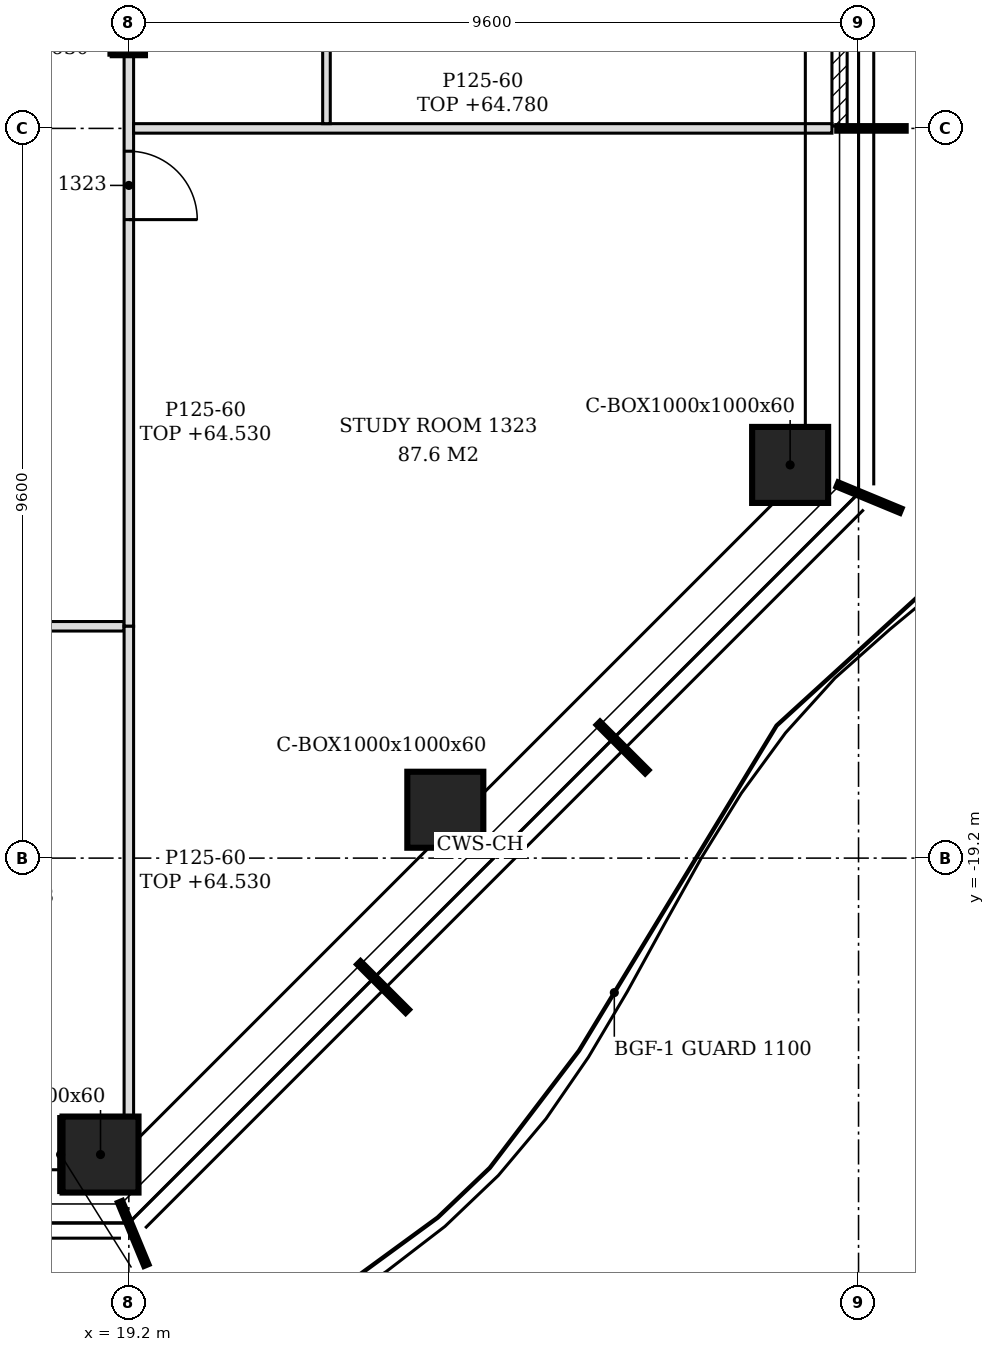
"""IFC4 building model, lengths in metres.
Left out: names, types, materials, properties, quantities, classifications, styles, units other than length and angle.
Written with IfcOpenShell. Run it as: python <this file> out.ifc"""

import sys

from ifc_helpers import new_model, si_unit, direction, frame, frame_2d, origin, origin_2d, place, context, subcontext, project, spatial, polyline, rectangle, hollow_rectangle, i_section, outline, extrude, element, fill, save


model = new_model("IFC4")
c1 = context("Model", 3, precision=1e-05, world=origin(), true_north=direction((0.0, 1.0)))
c2 = subcontext(c1, "Body", "Model", "MODEL_VIEW")
j1 = project(units=[si_unit("LENGTHUNIT", "METRE"), si_unit("PLANEANGLEUNIT", "RADIAN")], contexts=[c1])
p1 = place(None, origin())
s1 = spatial("IfcSite", under=j1, at=p1, CompositionType="ELEMENT")
p2 = place(p1, origin())
s2 = spatial("IfcBuilding", under=s1, at=p2, CompositionType="ELEMENT")
p3 = place(p2, frame((0.0, 0.0, 61.8)))
s3 = spatial("IfcBuildingStorey", under=s2, at=p3, CompositionType="ELEMENT", Elevation=61.8)
for number, where, z_axis, x_axis in (
    (1, (18.827, -23.1, -0.15), (0.0, 0.0, 1.0), (1.0, 0.0, 0.0)),
    (2, (23.364, -18.564, -0.15), (0.0, 0.0, 1.0), (1.0, 0.0, 0.0)),
    (3, (27.9, -14.027, -0.15), (0.0, 0.0, 1.0), (1.0, 0.0, 0.0)),
):
    element("IfcColumn", number, at=place(p3, frame(where, z_axis=z_axis, x_axis=x_axis)), inside=s3, PredefinedType="COLUMN", context=c2, shape_type="SweptSolid", body=[
        extrude(hollow_rectangle(XDim=1.0, YDim=1.0, WallThickness=0.06, at=origin_2d()), origin(), (0.0, 0.0, 1.0), 3.6),
    ])
p4 = place(p3, frame((19.2, -8.4, -0.15), z_axis=(0.0, 0.0, 1.0), x_axis=(1.0, 0.0, 0.0)))
e4 = element("IfcColumn", 4, at=p4, inside=s3, PredefinedType="COLUMN", context=c2, shape_type="SweptSolid", body=[
    extrude(i_section(OverallWidth=0.424, OverallDepth=0.474, WebThickness=0.048, FlangeThickness=0.077, FilletRadius=0.015, at=origin_2d()), origin(), (0.0, 0.0, 1.0), 3.6),
])
p5 = place(p3, frame((28.55, -9.57, 0.0), z_axis=(0.0, 0.0, 1.0), x_axis=(0.0, 1.0, 0.0)))
e5 = element("IfcWall", 5, at=p5, inside=s3, PredefinedType="NOTDEFINED", context=c2, shape_type="SweptSolid", body=[
    extrude(rectangle(XDim=4.74, YDim=0.2, at=frame_2d((2.37, 0.0))), origin(), (0.0, 0.0, 1.0), 3.45),
])
p6 = place(p5, frame((1.17, 0.0, 0.0)))
e6 = element("IfcOpeningElement", 6, at=p6, cuts=e5, PredefinedType="OPENING", context=c2, shape_type="SweptSolid", body=[
    extrude(rectangle(XDim=2.4, YDim=2.4, at=frame_2d((1.2, 1.2))), frame((0.0, 0.11, 0.0), z_axis=(0.0, -1.0, 0.0), x_axis=(1.0, 0.0, 0.0)), (0.0, 0.0, 1.0), 0.22),
])
p7 = place(p3, frame((19.2, -22.6, 0.0), z_axis=(0.0, 0.0, 1.0), x_axis=(0.0, 1.0, 0.0)))
e7 = element("IfcWall", 7, at=p7, inside=s3, PredefinedType="PARTITIONING", context=c2, shape_type="SweptSolid", body=[
    extrude(outline(polyline([(0.0, 0.0), (6.45, 0.0), (6.45, 2.73), (0.43, 2.73), (0.428, 2.63), (0.0, 2.63), (0.0, 0.0)])), frame((0.0, 0.062, 0.0), z_axis=(0.0, -1.0, 0.0), x_axis=(1.0, 0.0, 0.0)), (0.0, 0.0, 1.0), 0.125),
])
p8 = place(p3, frame((-22.55, -16.15, 0.0), z_axis=(0.0, 0.0, 1.0), x_axis=(1.0, 0.0, 0.0)))
e8 = element("IfcWall", 8, at=p8, inside=s3, PredefinedType="PARTITIONING", context=c2, shape_type="SweptSolid", body=[
    extrude(outline(polyline([(0.0, 0.0), (41.688, 0.0), (41.688, 2.73), (41.6, 2.73), (41.598, 3.45), (29.9, 3.45), (29.898, 2.73), (29.6, 2.73), (29.598, 3.45), (17.9, 3.45), (17.898, 2.73), (17.6, 2.73), (17.598, 3.45), (8.3, 3.45), (8.298, 2.93), (8.0, 2.93), (7.998, 3.45), (0.0, 3.45), (0.0, 0.0)])), frame((0.0, 0.062, 0.0), z_axis=(0.0, -1.0, 0.0), x_axis=(1.0, 0.0, 0.0)), (0.0, 0.0, 1.0), 0.125),
])
p9 = place(p8, frame((6.95, 0.0, 0.0)))
e9 = element("IfcOpeningElement", 9, at=p9, cuts=e8, PredefinedType="OPENING", context=c2, shape_type="SweptSolid", body=[
    extrude(rectangle(XDim=0.9, YDim=2.1, at=frame_2d((0.45, 1.05))), frame((0.0, 0.073, 0.0), z_axis=(0.0, -1.0, 0.0), x_axis=(1.0, 0.0, 0.0)), (0.0, 0.0, 1.0), 0.145),
])
p10 = place(p8, frame((11.936, 0.0, 0.0)))
e10 = element("IfcOpeningElement", 10, at=p10, cuts=e8, PredefinedType="OPENING", context=c2, shape_type="SweptSolid", body=[
    extrude(rectangle(XDim=0.9, YDim=2.1, at=frame_2d((0.45, 1.05))), frame((0.0, 0.073, 0.0), z_axis=(0.0, -1.0, 0.0), x_axis=(1.0, 0.0, 0.0)), (0.0, 0.0, 1.0), 0.145),
])
p11 = place(p8, frame((16.55, 0.0, 0.0)))
e11 = element("IfcOpeningElement", 11, at=p11, cuts=e8, PredefinedType="OPENING", context=c2, shape_type="SweptSolid", body=[
    extrude(rectangle(XDim=0.9, YDim=2.1, at=frame_2d((0.45, 1.05))), frame((0.0, 0.073, 0.0), z_axis=(0.0, -1.0, 0.0), x_axis=(1.0, 0.0, 0.0)), (0.0, 0.0, 1.0), 0.145),
])
p12 = place(p8, frame((21.35, 0.0, 0.0)))
e12 = element("IfcOpeningElement", 12, at=p12, cuts=e8, PredefinedType="OPENING", context=c2, shape_type="SweptSolid", body=[
    extrude(rectangle(XDim=0.9, YDim=2.1, at=frame_2d((0.45, 1.05))), frame((0.0, 0.073, 0.0), z_axis=(0.0, -1.0, 0.0), x_axis=(1.0, 0.0, 0.0)), (0.0, 0.0, 1.0), 0.145),
])
p13 = place(p8, frame((26.15, 0.0, 0.0)))
e13 = element("IfcOpeningElement", 13, at=p13, cuts=e8, PredefinedType="OPENING", context=c2, shape_type="SweptSolid", body=[
    extrude(rectangle(XDim=0.9, YDim=2.1, at=frame_2d((0.45, 1.05))), frame((0.0, 0.073, 0.0), z_axis=(0.0, -1.0, 0.0), x_axis=(1.0, 0.0, 0.0)), (0.0, 0.0, 1.0), 0.145),
])
p14 = place(p8, frame((30.764, 0.0, 0.0)))
e14 = element("IfcOpeningElement", 14, at=p14, cuts=e8, PredefinedType="OPENING", context=c2, shape_type="SweptSolid", body=[
    extrude(rectangle(XDim=0.9, YDim=2.1, at=frame_2d((0.45, 1.05))), frame((0.0, 0.073, 0.0), z_axis=(0.0, -1.0, 0.0), x_axis=(1.0, 0.0, 0.0)), (0.0, 0.0, 1.0), 0.145),
])
p15 = place(p8, frame((32.35, 0.0, 0.0)))
e15 = element("IfcOpeningElement", 15, at=p15, cuts=e8, PredefinedType="OPENING", context=c2, shape_type="SweptSolid", body=[
    extrude(rectangle(XDim=0.9, YDim=2.1, at=frame_2d((0.45, 1.05))), frame((0.0, 0.073, 0.0), z_axis=(0.0, -1.0, 0.0), x_axis=(1.0, 0.0, 0.0)), (0.0, 0.0, 1.0), 0.145),
])
p16 = place(p8, frame((37.25, 0.0, 0.0)))
e16 = element("IfcOpeningElement", 16, at=p16, cuts=e8, PredefinedType="OPENING", context=c2, shape_type="SweptSolid", body=[
    extrude(rectangle(XDim=0.9, YDim=2.1, at=frame_2d((0.45, 1.05))), frame((0.0, 0.073, 0.0), z_axis=(0.0, -1.0, 0.0), x_axis=(1.0, 0.0, 0.0)), (0.0, 0.0, 1.0), 0.145),
])
p17 = place(p3, frame((19.2, -16.15, 0.0), z_axis=(0.0, 0.0, 1.0), x_axis=(0.0, 1.0, 0.0)))
e17 = element("IfcWall", 17, at=p17, inside=s3, PredefinedType="PARTITIONING", context=c2, shape_type="SweptSolid", body=[
    extrude(rectangle(XDim=7.513, YDim=0.125, at=frame_2d((3.756, 0.0))), origin(), (0.0, 0.0, 1.0), 2.73),
])
p18 = place(p17, frame((5.35, 0.0, 0.0)))
e18 = element("IfcOpeningElement", 18, at=p18, cuts=e17, PredefinedType="OPENING", context=c2, shape_type="SweptSolid", body=[
    extrude(rectangle(XDim=0.9, YDim=2.1, at=frame_2d((0.45, 1.05))), frame((0.0, 0.073, 0.0), z_axis=(0.0, -1.0, 0.0), x_axis=(1.0, 0.0, 0.0)), (0.0, 0.0, 1.0), 0.145),
])
p19 = place(p3, frame((19.262, -9.6, 0.0), z_axis=(0.0, 0.0, 1.0), x_axis=(1.0, 0.0, 0.0)))
e19 = element("IfcWall", 19, at=p19, inside=s3, PredefinedType="PARTITIONING", context=c2, shape_type="SweptSolid", body=[
    extrude(outline(polyline([(0.0, 0.0), (9.188, 0.0), (9.188, 2.98), (8.788, 2.98), (8.785, 2.93), (8.488, 2.93), (8.486, 2.98), (0.087, 2.98), (0.085, 2.73), (0.0, 2.73), (0.0, 0.0)])), frame((0.0, 0.062, 0.0), z_axis=(0.0, -1.0, 0.0), x_axis=(1.0, 0.0, 0.0)), (0.0, 0.0, 1.0), 0.125),
])
p20 = place(p3, frame((21.8, -9.538, 0.0), z_axis=(0.0, 0.0, 1.0), x_axis=(0.0, 1.0, 0.0)))
e20 = element("IfcWall", 20, at=p20, inside=s3, PredefinedType="PARTITIONING", context=c2, shape_type="SweptSolid", body=[
    extrude(outline(polyline([(0.0, 0.0), (2.288, 0.0), (2.288, 3.45), (0.032, 3.45), (0.031, 2.98), (0.0, 2.98), (0.0, 0.0)])), frame((0.0, 0.05, 0.0), z_axis=(0.0, -1.0, 0.0), x_axis=(1.0, 0.0, 0.0)), (0.0, 0.0, 1.0), 0.1),
])
p21 = place(p3, frame((18.302, -23.6, 0.0), z_axis=(0.0, 0.0, 1.0), x_axis=(0.0, 1.0, 0.0)))
e21 = element("IfcWall", 21, at=p21, inside=s3, PredefinedType="PARTITIONING", context=c2, shape_type="SweptSolid", body=[
    extrude(rectangle(XDim=1.0, YDim=0.05, at=frame_2d((0.5, 0.0))), origin(), (0.0, 0.0, 1.0), 2.93),
])
p22 = place(p3, frame((18.963, -8.637, 0.0), z_axis=(0.0, 0.0, 1.0), x_axis=(0.0, 1.0, 0.0)))
e22 = element("IfcWall", 22, at=p22, inside=s3, PredefinedType="PARTITIONING", context=c2, shape_type="SweptSolid", body=[
    extrude(rectangle(XDim=0.474, YDim=0.05, at=frame_2d((0.237, 0.0))), origin(), (0.0, 0.0, 1.0), 2.83),
])
p23 = place(p18, frame((0.9, 0.0, 0.0), z_axis=(0.0, 0.0, 1.0), x_axis=(-1.0, 0.0, 0.0)))
e23 = element("IfcDoor", 23, at=p23, inside=s3, OperationType="SINGLE_SWING_RIGHT", PredefinedType="DOOR", context=c2, shape_type="SweptSolid", body=[
    extrude(rectangle(XDim=0.9, YDim=2.1, at=frame_2d((0.45, 1.05))), frame((0.0, 0.025, 0.0), z_axis=(0.0, -1.0, 0.0), x_axis=(1.0, 0.0, 0.0)), (0.0, 0.0, 1.0), 0.05),
])
fill(e18, e23)
save(model, sys.argv[1])
